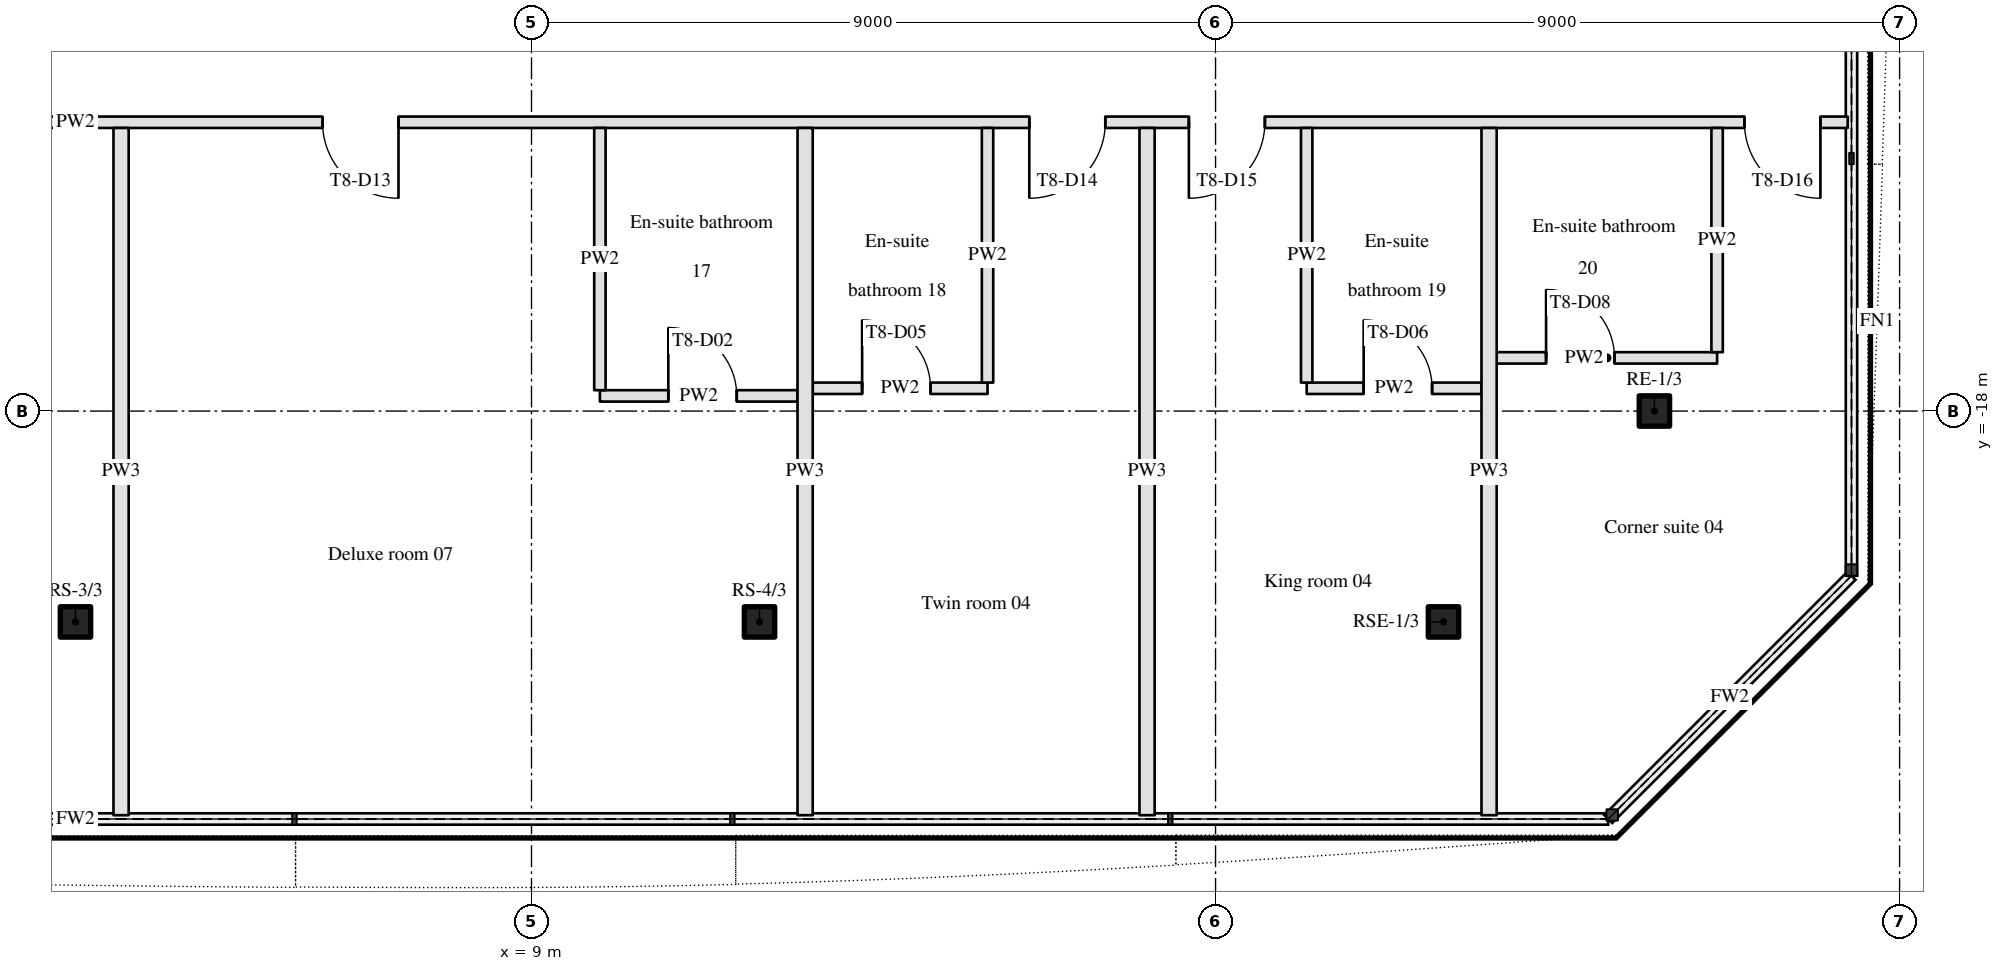
"""IFC4 building model, lengths in metres.
Left out: names, types, materials, properties, quantities, classifications, styles, units other than length and angle.
Written with IfcOpenShell. Run it as: python <this file> out.ifc"""

import sys

from ifc_helpers import new_model, si_unit, direction, frame, frame_2d, origin, origin_2d, place, context, subcontext, project, spatial, rectangle, hollow_rectangle, extrude, element, fill, save


model = new_model("IFC4")
c1 = context("Model", 3, precision=1e-05, world=origin(), true_north=direction((0.0, 1.0)))
c2 = subcontext(c1, "Body", "Model", "MODEL_VIEW")
j1 = project(units=[si_unit("LENGTHUNIT", "METRE"), si_unit("PLANEANGLEUNIT", "RADIAN")], contexts=[c1])
p1 = place(None, origin())
s1 = spatial("IfcSite", under=j1, at=p1, CompositionType="ELEMENT")
p2 = place(p1, origin())
s2 = spatial("IfcBuilding", under=s1, at=p2, CompositionType="ELEMENT")
p3 = place(p2, frame((0.0, 0.0, 121.5)))
s3 = spatial("IfcBuildingStorey", under=s2, at=p3, CompositionType="ELEMENT", Elevation=121.5)
for number, where, z_axis, x_axis in (
    (1, (3.0, -20.774, 0.0), (0.0, 0.0, 1.0), (1.0, 0.0, 0.0)),
    (2, (12.0, -20.774, 0.0), (0.0, 0.0, 1.0), (1.0, 0.0, 0.0)),
    (3, (20.999, -20.774, 0.0), (0.0, 0.0, 1.0), (1.0, 0.0, 0.0)),
    (4, (23.774, -17.999, 0.0), (0.0, 0.0, 1.0), (1.0, 0.0, 0.0)),
):
    element("IfcColumn", number, at=place(p3, frame(where, z_axis=z_axis, x_axis=x_axis)), inside=s3, PredefinedType="COLUMN", context=c2, shape_type="SweptSolid", body=[
        extrude(hollow_rectangle(XDim=0.4, YDim=0.4, WallThickness=0.02, InnerFilletRadius=0.03, OuterFilletRadius=0.05, at=origin_2d()), origin(), (0.0, 0.0, 1.0), 3.4),
    ])
p4 = place(p3, frame((9.9, -17.8, 0.0), z_axis=(0.0, 0.0, 1.0), x_axis=(1.0, 0.0, 0.0)))
e5 = element("IfcWall", 5, at=p4, inside=s3, PredefinedType="PARTITIONING", context=c2, shape_type="SweptSolid", body=[
    extrude(rectangle(XDim=2.6, YDim=0.15, at=frame_2d((1.3, 0.0))), origin(), (0.0, 0.0, 1.0), 2.46),
])
p5 = place(p4, frame((0.9, 0.0, 0.0)))
e6 = element("IfcOpeningElement", 6, at=p5, cuts=e5, PredefinedType="OPENING", context=c2, shape_type="SweptSolid", body=[
    extrude(rectangle(XDim=0.9, YDim=2.1, at=frame_2d((0.45, 1.05))), frame((0.0, 0.085, 0.0), z_axis=(0.0, -1.0, 0.0), x_axis=(1.0, 0.0, 0.0)), (0.0, 0.0, 1.0), 0.17),
])
p6 = place(p3, frame((12.7, -17.7, 0.0), z_axis=(0.0, 0.0, 1.0), x_axis=(1.0, 0.0, 0.0)))
e7 = element("IfcWall", 7, at=p6, inside=s3, PredefinedType="PARTITIONING", context=c2, shape_type="SweptSolid", body=[
    extrude(rectangle(XDim=2.3, YDim=0.15, at=frame_2d((1.15, 0.0))), origin(), (0.0, 0.0, 1.0), 2.46),
])
p7 = place(p6, frame((0.65, 0.0, 0.0)))
e8 = element("IfcOpeningElement", 8, at=p7, cuts=e7, PredefinedType="OPENING", context=c2, shape_type="SweptSolid", body=[
    extrude(rectangle(XDim=0.9, YDim=2.1, at=frame_2d((0.45, 1.05))), frame((0.0, 0.085, 0.0), z_axis=(0.0, -1.0, 0.0), x_axis=(1.0, 0.0, 0.0)), (0.0, 0.0, 1.0), 0.17),
])
p8 = place(p3, frame((19.199, -17.7, 0.0), z_axis=(0.0, 0.0, 1.0), x_axis=(1.0, 0.0, 0.0)))
e9 = element("IfcWall", 9, at=p8, inside=s3, PredefinedType="PARTITIONING", context=c2, shape_type="SweptSolid", body=[
    extrude(rectangle(XDim=2.3, YDim=0.15, at=frame_2d((1.15, 0.0))), origin(), (0.0, 0.0, 1.0), 2.46),
])
p9 = place(p8, frame((0.75, 0.0, 0.0)))
e10 = element("IfcOpeningElement", 10, at=p9, cuts=e9, PredefinedType="OPENING", context=c2, shape_type="SweptSolid", body=[
    extrude(rectangle(XDim=0.9, YDim=2.1, at=frame_2d((0.45, 1.05))), frame((0.0, 0.085, 0.0), z_axis=(0.0, -1.0, 0.0), x_axis=(1.0, 0.0, 0.0)), (0.0, 0.0, 1.0), 0.17),
])
p10 = place(p3, frame((21.699, -17.3, 0.0), z_axis=(0.0, 0.0, 1.0), x_axis=(1.0, 0.0, 0.0)))
e11 = element("IfcWall", 11, at=p10, inside=s3, PredefinedType="PARTITIONING", context=c2, shape_type="SweptSolid", body=[
    extrude(rectangle(XDim=2.9, YDim=0.15, at=frame_2d((1.45, 0.0))), origin(), (0.0, 0.0, 1.0), 2.46),
])
p11 = place(p10, frame((0.65, 0.0, 0.0)))
e12 = element("IfcOpeningElement", 12, at=p11, cuts=e11, PredefinedType="OPENING", context=c2, shape_type="SweptSolid", body=[
    extrude(rectangle(XDim=0.9, YDim=2.1, at=frame_2d((0.45, 1.05))), frame((0.0, 0.085, 0.0), z_axis=(0.0, -1.0, 0.0), x_axis=(1.0, 0.0, 0.0)), (0.0, 0.0, 1.0), 0.17),
])
p12 = place(p3, frame((26.317, -14.2, 0.0), z_axis=(0.0, 0.0, 1.0), x_axis=(-1.0, 0.0, 0.0)))
e13 = element("IfcWall", 13, at=p12, inside=s3, PredefinedType="PARTITIONING", context=c2, shape_type="SweptSolid", body=[
    extrude(rectangle(XDim=46.634, YDim=0.15, at=frame_2d((23.317, 0.0))), origin(), (0.0, 0.0, 1.0), 2.46),
])
p13 = place(p12, frame((44.675, 0.0, 0.0)))
e14 = element("IfcOpeningElement", 14, at=p13, cuts=e13, PredefinedType="OPENING", context=c2, shape_type="SweptSolid", body=[
    extrude(rectangle(XDim=1.0, YDim=2.1, at=frame_2d((0.5, 1.05))), frame((0.0, 0.085, 0.0), z_axis=(0.0, -1.0, 0.0), x_axis=(1.0, 0.0, 0.0)), (0.0, 0.0, 1.0), 0.17),
])
p14 = place(p12, frame((36.766, 0.0, 0.0)))
e15 = element("IfcOpeningElement", 15, at=p14, cuts=e13, PredefinedType="OPENING", context=c2, shape_type="SweptSolid", body=[
    extrude(rectangle(XDim=1.0, YDim=2.1, at=frame_2d((0.5, 1.05))), frame((0.0, 0.085, 0.0), z_axis=(0.0, -1.0, 0.0), x_axis=(1.0, 0.0, 0.0)), (0.0, 0.0, 1.0), 0.17),
])
p15 = place(p12, frame((34.667, 0.0, 0.0)))
e16 = element("IfcOpeningElement", 16, at=p15, cuts=e13, PredefinedType="OPENING", context=c2, shape_type="SweptSolid", body=[
    extrude(rectangle(XDim=1.0, YDim=2.1, at=frame_2d((0.5, 1.05))), frame((0.0, 0.085, 0.0), z_axis=(0.0, -1.0, 0.0), x_axis=(1.0, 0.0, 0.0)), (0.0, 0.0, 1.0), 0.17),
])
p16 = place(p12, frame((25.367, 0.0, 0.0)))
e17 = element("IfcOpeningElement", 17, at=p16, cuts=e13, PredefinedType="OPENING", context=c2, shape_type="SweptSolid", body=[
    extrude(rectangle(XDim=1.0, YDim=2.1, at=frame_2d((0.5, 1.05))), frame((0.0, 0.085, 0.0), z_axis=(0.0, -1.0, 0.0), x_axis=(1.0, 0.0, 0.0)), (0.0, 0.0, 1.0), 0.17),
])
p17 = place(p12, frame((19.067, 0.0, 0.0)))
e18 = element("IfcOpeningElement", 18, at=p17, cuts=e13, PredefinedType="OPENING", context=c2, shape_type="SweptSolid", body=[
    extrude(rectangle(XDim=1.0, YDim=2.1, at=frame_2d((0.5, 1.05))), frame((0.0, 0.085, 0.0), z_axis=(0.0, -1.0, 0.0), x_axis=(1.0, 0.0, 0.0)), (0.0, 0.0, 1.0), 0.17),
])
p18 = place(p12, frame((9.768, 0.0, 0.0)))
e19 = element("IfcOpeningElement", 19, at=p18, cuts=e13, PredefinedType="OPENING", context=c2, shape_type="SweptSolid", body=[
    extrude(rectangle(XDim=1.0, YDim=2.1, at=frame_2d((0.5, 1.05))), frame((0.0, 0.085, 0.0), z_axis=(0.0, -1.0, 0.0), x_axis=(1.0, 0.0, 0.0)), (0.0, 0.0, 1.0), 0.17),
])
p19 = place(p12, frame((7.668, 0.0, 0.0)))
e20 = element("IfcOpeningElement", 20, at=p19, cuts=e13, PredefinedType="OPENING", context=c2, shape_type="SweptSolid", body=[
    extrude(rectangle(XDim=1.0, YDim=2.1, at=frame_2d((0.5, 1.05))), frame((0.0, 0.085, 0.0), z_axis=(0.0, -1.0, 0.0), x_axis=(1.0, 0.0, 0.0)), (0.0, 0.0, 1.0), 0.17),
])
p20 = place(p12, frame((0.359, 0.0, 0.0)))
e21 = element("IfcOpeningElement", 21, at=p20, cuts=e13, PredefinedType="OPENING", context=c2, shape_type="SweptSolid", body=[
    extrude(rectangle(XDim=1.0, YDim=2.1, at=frame_2d((0.5, 1.05))), frame((0.0, 0.085, 0.0), z_axis=(0.0, -1.0, 0.0), x_axis=(1.0, 0.0, 0.0)), (0.0, 0.0, 1.0), 0.17),
])
p21 = place(p3, frame((3.6, -23.317, 0.0), z_axis=(0.0, 0.0, 1.0), x_axis=(0.0, 1.0, 0.0)))
e22 = element("IfcWall", 22, at=p21, inside=s3, PredefinedType="PARTITIONING", context=c2, shape_type="SweptSolid", body=[
    extrude(rectangle(XDim=9.042, YDim=0.2, at=frame_2d((4.521, 0.0))), origin(), (0.0, 0.0, 1.0), 2.46),
])
p22 = place(p3, frame((9.9, -17.725, 0.0), z_axis=(0.0, 0.0, 1.0), x_axis=(0.0, 1.0, 0.0)))
e23 = element("IfcWall", 23, at=p22, inside=s3, PredefinedType="PARTITIONING", context=c2, shape_type="SweptSolid", body=[
    extrude(rectangle(XDim=3.45, YDim=0.15, at=frame_2d((1.725, 0.0))), origin(), (0.0, 0.0, 1.0), 2.46),
])
p23 = place(p3, frame((12.6, -23.317, 0.0), z_axis=(0.0, 0.0, 1.0), x_axis=(0.0, 1.0, 0.0)))
e24 = element("IfcWall", 24, at=p23, inside=s3, PredefinedType="PARTITIONING", context=c2, shape_type="SweptSolid", body=[
    extrude(rectangle(XDim=9.042, YDim=0.2, at=frame_2d((4.521, 0.0))), origin(), (0.0, 0.0, 1.0), 2.46),
])
p24 = place(p3, frame((15.0, -17.625, 0.0), z_axis=(0.0, 0.0, 1.0), x_axis=(0.0, 1.0, 0.0)))
e25 = element("IfcWall", 25, at=p24, inside=s3, PredefinedType="PARTITIONING", context=c2, shape_type="SweptSolid", body=[
    extrude(rectangle(XDim=3.35, YDim=0.15, at=frame_2d((1.675, 0.0))), origin(), (0.0, 0.0, 1.0), 2.46),
])
p25 = place(p3, frame((17.099, -23.317, 0.0), z_axis=(0.0, 0.0, 1.0), x_axis=(0.0, 1.0, 0.0)))
e26 = element("IfcWall", 26, at=p25, inside=s3, PredefinedType="PARTITIONING", context=c2, shape_type="SweptSolid", body=[
    extrude(rectangle(XDim=9.042, YDim=0.2, at=frame_2d((4.521, 0.0))), origin(), (0.0, 0.0, 1.0), 2.46),
])
p26 = place(p3, frame((19.199, -17.625, 0.0), z_axis=(0.0, 0.0, 1.0), x_axis=(0.0, 1.0, 0.0)))
e27 = element("IfcWall", 27, at=p26, inside=s3, PredefinedType="PARTITIONING", context=c2, shape_type="SweptSolid", body=[
    extrude(rectangle(XDim=3.35, YDim=0.15, at=frame_2d((1.675, 0.0))), origin(), (0.0, 0.0, 1.0), 2.46),
])
p27 = place(p3, frame((21.599, -23.317, 0.0), z_axis=(0.0, 0.0, 1.0), x_axis=(0.0, 1.0, 0.0)))
e28 = element("IfcWall", 28, at=p27, inside=s3, PredefinedType="PARTITIONING", context=c2, shape_type="SweptSolid", body=[
    extrude(rectangle(XDim=9.042, YDim=0.2, at=frame_2d((4.521, 0.0))), origin(), (0.0, 0.0, 1.0), 2.46),
])
p28 = place(p3, frame((24.599, -17.225, 0.0), z_axis=(0.0, 0.0, 1.0), x_axis=(0.0, 1.0, 0.0)))
e29 = element("IfcWall", 29, at=p28, inside=s3, PredefinedType="PARTITIONING", context=c2, shape_type="SweptSolid", body=[
    extrude(rectangle(XDim=2.95, YDim=0.15, at=frame_2d((1.475, 0.0))), origin(), (0.0, 0.0, 1.0), 2.46),
])
p29 = place(p17, origin())
e30 = element("IfcDoor", 30, at=p29, inside=s3, OperationType="SINGLE_SWING_LEFT", PredefinedType="DOOR", context=c2, shape_type="SweptSolid", body=[
    extrude(rectangle(XDim=1.0, YDim=2.1, at=frame_2d((0.5, 1.05))), frame((0.0, 0.025, 0.0), z_axis=(0.0, -1.0, 0.0), x_axis=(1.0, 0.0, 0.0)), (0.0, 0.0, 1.0), 0.05),
])
fill(e18, e30)
p30 = place(p18, origin())
e31 = element("IfcDoor", 31, at=p30, inside=s3, OperationType="SINGLE_SWING_RIGHT", PredefinedType="DOOR", context=c2, shape_type="SweptSolid", body=[
    extrude(rectangle(XDim=1.0, YDim=2.1, at=frame_2d((0.5, 1.05))), frame((0.0, 0.025, 0.0), z_axis=(0.0, -1.0, 0.0), x_axis=(1.0, 0.0, 0.0)), (0.0, 0.0, 1.0), 0.05),
])
fill(e19, e31)
p31 = place(p19, origin())
e32 = element("IfcDoor", 32, at=p31, inside=s3, OperationType="SINGLE_SWING_RIGHT", PredefinedType="DOOR", context=c2, shape_type="SweptSolid", body=[
    extrude(rectangle(XDim=1.0, YDim=2.1, at=frame_2d((0.5, 1.05))), frame((0.0, 0.025, 0.0), z_axis=(0.0, -1.0, 0.0), x_axis=(1.0, 0.0, 0.0)), (0.0, 0.0, 1.0), 0.05),
])
fill(e20, e32)
p32 = place(p20, origin())
e33 = element("IfcDoor", 33, at=p32, inside=s3, OperationType="SINGLE_SWING_LEFT", PredefinedType="DOOR", context=c2, shape_type="SweptSolid", body=[
    extrude(rectangle(XDim=1.0, YDim=2.1, at=frame_2d((0.5, 1.05))), frame((0.0, 0.025, 0.0), z_axis=(0.0, -1.0, 0.0), x_axis=(1.0, 0.0, 0.0)), (0.0, 0.0, 1.0), 0.05),
])
fill(e21, e33)
p33 = place(p5, origin())
e34 = element("IfcDoor", 34, at=p33, inside=s3, OperationType="SINGLE_SWING_LEFT", PredefinedType="DOOR", context=c2, shape_type="SweptSolid", body=[
    extrude(rectangle(XDim=0.9, YDim=2.1, at=frame_2d((0.45, 1.05))), frame((0.0, 0.025, 0.0), z_axis=(0.0, -1.0, 0.0), x_axis=(1.0, 0.0, 0.0)), (0.0, 0.0, 1.0), 0.05),
])
fill(e6, e34)
p34 = place(p7, origin())
e35 = element("IfcDoor", 35, at=p34, inside=s3, OperationType="SINGLE_SWING_LEFT", PredefinedType="DOOR", context=c2, shape_type="SweptSolid", body=[
    extrude(rectangle(XDim=0.9, YDim=2.1, at=frame_2d((0.45, 1.05))), frame((0.0, 0.025, 0.0), z_axis=(0.0, -1.0, 0.0), x_axis=(1.0, 0.0, 0.0)), (0.0, 0.0, 1.0), 0.05),
])
fill(e8, e35)
p35 = place(p9, origin())
e36 = element("IfcDoor", 36, at=p35, inside=s3, OperationType="SINGLE_SWING_LEFT", PredefinedType="DOOR", context=c2, shape_type="SweptSolid", body=[
    extrude(rectangle(XDim=0.9, YDim=2.1, at=frame_2d((0.45, 1.05))), frame((0.0, 0.025, 0.0), z_axis=(0.0, -1.0, 0.0), x_axis=(1.0, 0.0, 0.0)), (0.0, 0.0, 1.0), 0.05),
])
fill(e10, e36)
p36 = place(p11, origin())
e37 = element("IfcDoor", 37, at=p36, inside=s3, OperationType="SINGLE_SWING_LEFT", PredefinedType="DOOR", context=c2, shape_type="SweptSolid", body=[
    extrude(rectangle(XDim=0.9, YDim=2.1, at=frame_2d((0.45, 1.05))), frame((0.0, 0.025, 0.0), z_axis=(0.0, -1.0, 0.0), x_axis=(1.0, 0.0, 0.0)), (0.0, 0.0, 1.0), 0.05),
])
fill(e12, e37)
save(model, sys.argv[1])
